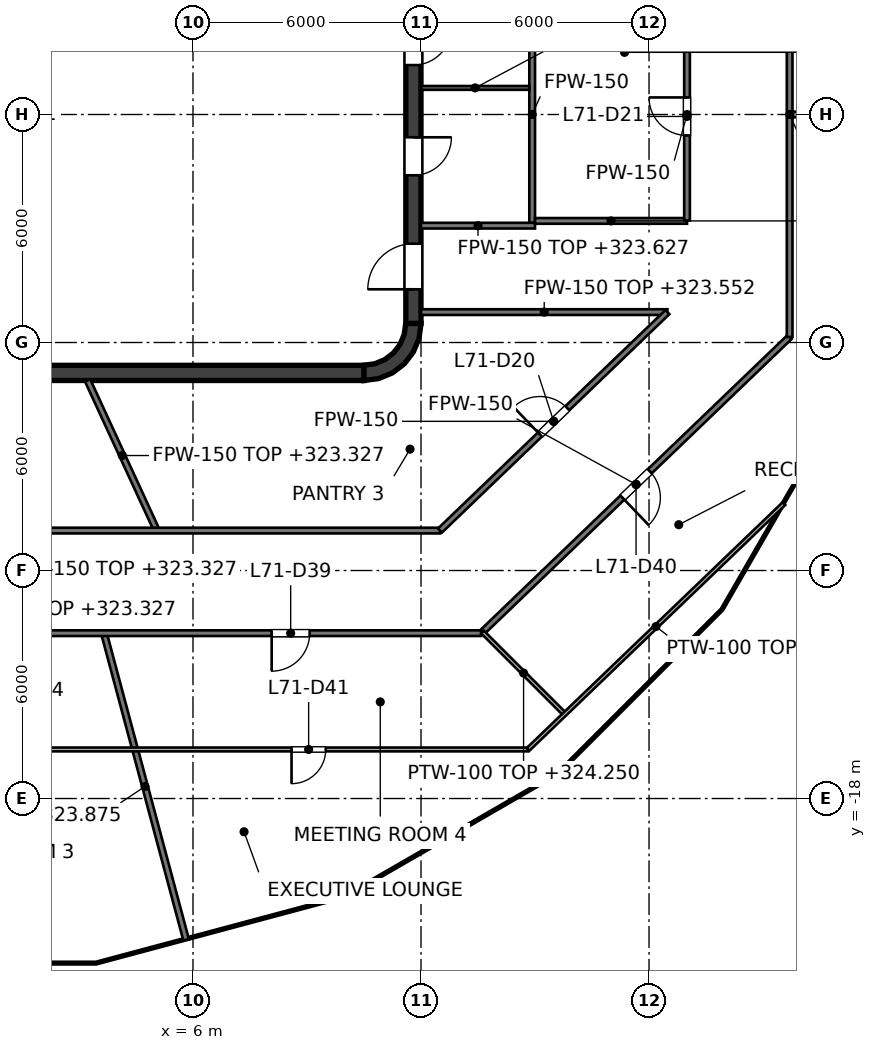
"""IFC4 building model, lengths in metres.
Left out: names, types, materials, properties, quantities, classifications, styles, units other than length and angle.
Written with IfcOpenShell. Run it as: python <this file> out.ifc"""

import sys

from ifc_helpers import new_model, si_unit, direction, frame, frame_2d, origin, place, context, subcontext, project, spatial, polyline, rectangle, outline, extrude, element, fill, save


model = new_model("IFC4")
c1 = context("Model", 3, precision=1e-05, world=origin(), true_north=direction((0.0, 1.0)))
c2 = subcontext(c1, "Body", "Model", "MODEL_VIEW")
j1 = project(units=[si_unit("LENGTHUNIT", "METRE"), si_unit("PLANEANGLEUNIT", "RADIAN")], contexts=[c1])
p1 = place(None, origin())
s1 = spatial("IfcSite", under=j1, at=p1, CompositionType="ELEMENT")
p2 = place(p1, origin())
s2 = spatial("IfcBuilding", under=s1, at=p2, CompositionType="ELEMENT")
p3 = place(p2, frame((0.0, 0.0, 320.4)))
s3 = spatial("IfcBuildingStorey", under=s2, at=p3, CompositionType="ELEMENT", Elevation=320.4)
p4 = place(p3, frame((-10.5, -6.8, 0.0), z_axis=(0.0, 0.0, 1.0), x_axis=(1.0, 0.0, 0.0)))
e1 = element("IfcWall", 1, at=p4, inside=s3, PredefinedType="SHEAR", context=c2, shape_type="SweptSolid", body=[
    extrude(rectangle(XDim=21.0, YDim=0.4, at=frame_2d((10.5, 0.0))), origin(), (0.0, 0.0, 1.0), 4.0),
])
p5 = place(p3, frame((11.8, -5.5, 0.0), z_axis=(0.0, 0.0, 1.0), x_axis=(0.0, 1.0, 0.0)))
e2 = element("IfcWall", 2, at=p5, inside=s3, PredefinedType="SHEAR", context=c2, shape_type="SweptSolid", body=[
    extrude(rectangle(XDim=11.0, YDim=0.4, at=frame_2d((5.5, 0.0))), origin(), (0.0, 0.0, 1.0), 4.0),
])
p6 = place(p5, frame((3.9, 0.0, 0.0)))
e3 = element("IfcOpeningElement", 3, at=p6, cuts=e2, PredefinedType="OPENING", context=c2, shape_type="SweptSolid", body=[
    extrude(rectangle(XDim=1.0, YDim=2.1, at=frame_2d((0.5, 1.05))), frame((0.0, 0.2, 0.0), z_axis=(0.0, -1.0, 0.0), x_axis=(1.0, 0.0, 0.0)), (0.0, 0.0, 1.0), 0.4),
])
p7 = place(p5, frame((6.8, 0.0, 0.0)))
e4 = element("IfcOpeningElement", 4, at=p7, cuts=e2, PredefinedType="OPENING", context=c2, shape_type="SweptSolid", body=[
    extrude(rectangle(XDim=1.0, YDim=2.1, at=frame_2d((0.5, 1.05))), frame((0.0, 0.2, 0.0), z_axis=(0.0, -1.0, 0.0), x_axis=(1.0, 0.0, 0.0)), (0.0, 0.0, 1.0), 0.4),
])
p8 = place(p5, frame((0.9, 0.0, 0.0)))
e5 = element("IfcOpeningElement", 5, at=p8, cuts=e2, PredefinedType="OPENING", context=c2, shape_type="SweptSolid", body=[
    extrude(rectangle(XDim=1.2, YDim=2.1, at=frame_2d((0.6, 1.05))), frame((0.0, 0.2, 0.0), z_axis=(0.0, -1.0, 0.0), x_axis=(1.0, 0.0, 0.0)), (0.0, 0.0, 1.0), 0.4),
])
p9 = place(p5, frame((8.9, 0.0, 0.0)))
e6 = element("IfcOpeningElement", 6, at=p9, cuts=e2, PredefinedType="OPENING", context=c2, shape_type="SweptSolid", body=[
    extrude(rectangle(XDim=1.2, YDim=2.1, at=frame_2d((0.6, 1.05))), frame((0.0, 0.2, 0.0), z_axis=(0.0, -1.0, 0.0), x_axis=(1.0, 0.0, 0.0)), (0.0, 0.0, 1.0), 0.4),
])
p10 = place(p3, origin())
e7 = element("IfcWall", 7, at=p10, inside=s3, PredefinedType="SHEAR", context=c2, shape_type="SweptSolid", body=[
    extrude(outline(polyline([(12.0, -5.5), (11.596, -5.5), (11.559, -5.784), (11.45, -6.048), (11.275, -6.275), (11.048, -6.45), (10.784, -6.559), (10.5, -6.596), (10.5, -7.0), (10.888, -6.949), (11.25, -6.799), (11.561, -6.561), (11.799, -6.25), (11.949, -5.888), (12.0, -5.5)])), origin(), (0.0, 0.0, 1.0), 4.0),
])
p11 = place(p3, frame((9.0, -6.6, 0.0), z_axis=(0.0, 0.0, 1.0), x_axis=(0.0, 1.0, 0.0)))
e8 = element("IfcWall", 8, at=p11, inside=s3, PredefinedType="SOLIDWALL", context=c2, shape_type="SweptSolid", body=[
    extrude(rectangle(XDim=2.5, YDim=0.25, at=frame_2d((1.25, 0.0))), origin(), (0.0, 0.0, 1.0), 3.85),
])
p12 = place(p11, frame((0.65, 0.0, 0.0)))
e9 = element("IfcOpeningElement", 9, at=p12, cuts=e8, PredefinedType="OPENING", context=c2, shape_type="SweptSolid", body=[
    extrude(rectangle(XDim=1.2, YDim=2.1, at=frame_2d((0.6, 1.05))), frame((0.0, 0.125, 0.0), z_axis=(0.0, -1.0, 0.0), x_axis=(1.0, 0.0, 0.0)), (0.0, 0.0, 1.0), 0.25),
])
p13 = place(p3, frame((3.15, -6.6, 0.0), z_axis=(0.0, 0.0, 1.0), x_axis=(0.0, 1.0, 0.0)))
e10 = element("IfcWall", 10, at=p13, inside=s3, PredefinedType="SOLIDWALL", context=c2, shape_type="SweptSolid", body=[
    extrude(rectangle(XDim=2.5, YDim=0.25, at=frame_2d((1.25, 0.0))), origin(), (0.0, 0.0, 1.0), 3.85),
])
p14 = place(p3, frame((0.775, 1.525, 0.0), z_axis=(0.0, 0.0, 1.0), x_axis=(1.0, 0.0, 0.0)))
e11 = element("IfcWall", 11, at=p14, inside=s3, PredefinedType="SOLIDWALL", context=c2, shape_type="SweptSolid", body=[
    extrude(rectangle(XDim=8.35, YDim=0.25, at=frame_2d((4.175, 0.0))), origin(), (0.0, 0.0, 1.0), 3.85),
])
p15 = place(p14, frame((0.925, 0.0, 0.0)))
e12 = element("IfcOpeningElement", 12, at=p15, cuts=e11, PredefinedType="OPENING", context=c2, shape_type="SweptSolid", body=[
    extrude(rectangle(XDim=1.1, YDim=2.1, at=frame_2d((0.55, 1.05))), frame((0.0, 0.125, 0.0), z_axis=(0.0, -1.0, 0.0), x_axis=(1.0, 0.0, 0.0)), (0.0, 0.0, 1.0), 0.25),
])
p16 = place(p14, frame((3.625, 0.0, 0.0)))
e13 = element("IfcOpeningElement", 13, at=p16, cuts=e11, PredefinedType="OPENING", context=c2, shape_type="SweptSolid", body=[
    extrude(rectangle(XDim=1.1, YDim=2.1, at=frame_2d((0.55, 1.05))), frame((0.0, 0.125, 0.0), z_axis=(0.0, -1.0, 0.0), x_axis=(1.0, 0.0, 0.0)), (0.0, 0.0, 1.0), 0.25),
])
p17 = place(p14, frame((6.325, 0.0, 0.0)))
e14 = element("IfcOpeningElement", 14, at=p17, cuts=e11, PredefinedType="OPENING", context=c2, shape_type="SweptSolid", body=[
    extrude(rectangle(XDim=1.1, YDim=2.1, at=frame_2d((0.55, 1.05))), frame((0.0, 0.125, 0.0), z_axis=(0.0, -1.0, 0.0), x_axis=(1.0, 0.0, 0.0)), (0.0, 0.0, 1.0), 0.25),
])
p18 = place(p3, frame((-9.125, -1.525, 0.0), z_axis=(0.0, 0.0, 1.0), x_axis=(1.0, 0.0, 0.0)))
e15 = element("IfcWall", 15, at=p18, inside=s3, PredefinedType="SOLIDWALL", context=c2, shape_type="SweptSolid", body=[
    extrude(rectangle(XDim=18.25, YDim=0.25, at=frame_2d((9.125, 0.0))), origin(), (0.0, 0.0, 1.0), 3.85),
])
p19 = place(p18, frame((7.15, 0.0, 0.0)))
e16 = element("IfcOpeningElement", 16, at=p19, cuts=e15, PredefinedType="OPENING", context=c2, shape_type="SweptSolid", body=[
    extrude(rectangle(XDim=1.2, YDim=2.1, at=frame_2d((0.6, 1.05))), frame((0.0, 0.125, 0.0), z_axis=(0.0, -1.0, 0.0), x_axis=(1.0, 0.0, 0.0)), (0.0, 0.0, 1.0), 0.25),
])
p20 = place(p18, frame((10.2, 0.0, 0.0)))
e17 = element("IfcOpeningElement", 17, at=p20, cuts=e15, PredefinedType="OPENING", context=c2, shape_type="SweptSolid", body=[
    extrude(rectangle(XDim=1.2, YDim=2.1, at=frame_2d((0.6, 1.05))), frame((0.0, 0.125, 0.0), z_axis=(0.0, -1.0, 0.0), x_axis=(1.0, 0.0, 0.0)), (0.0, 0.0, 1.0), 0.25),
])
p21 = place(p18, frame((16.075, 0.0, 0.0)))
e18 = element("IfcOpeningElement", 18, at=p21, cuts=e15, PredefinedType="OPENING", context=c2, shape_type="SweptSolid", body=[
    extrude(rectangle(XDim=1.0, YDim=2.1, at=frame_2d((0.5, 1.05))), frame((0.0, 0.125, 0.0), z_axis=(0.0, -1.0, 0.0), x_axis=(1.0, 0.0, 0.0)), (0.0, 0.0, 1.0), 0.25),
])
p22 = place(p3, frame((-9.125, -3.975, 0.0), z_axis=(0.0, 0.0, 1.0), x_axis=(1.0, 0.0, 0.0)))
e19 = element("IfcWall", 19, at=p22, inside=s3, PredefinedType="SOLIDWALL", context=c2, shape_type="SweptSolid", body=[
    extrude(rectangle(XDim=12.4, YDim=0.25, at=frame_2d((6.2, 0.0))), origin(), (0.0, 0.0, 1.0), 3.85),
])
p23 = place(p22, frame((1.05, 0.0, 0.0)))
e20 = element("IfcOpeningElement", 20, at=p23, cuts=e19, PredefinedType="OPENING", context=c2, shape_type="SweptSolid", body=[
    extrude(rectangle(XDim=1.2, YDim=2.1, at=frame_2d((0.6, 1.05))), frame((0.0, 0.125, 0.0), z_axis=(0.0, -1.0, 0.0), x_axis=(1.0, 0.0, 0.0)), (0.0, 0.0, 1.0), 0.25),
])
p24 = place(p22, frame((4.1, 0.0, 0.0)))
e21 = element("IfcOpeningElement", 21, at=p24, cuts=e19, PredefinedType="OPENING", context=c2, shape_type="SweptSolid", body=[
    extrude(rectangle(XDim=1.2, YDim=2.1, at=frame_2d((0.6, 1.05))), frame((0.0, 0.125, 0.0), z_axis=(0.0, -1.0, 0.0), x_axis=(1.0, 0.0, 0.0)), (0.0, 0.0, 1.0), 0.25),
])
p25 = place(p3, frame((3.275, -3.975, 0.0), z_axis=(0.0, 0.0, 1.0), x_axis=(1.0, 0.0, 0.0)))
e22 = element("IfcWall", 22, at=p25, inside=s3, PredefinedType="SOLIDWALL", context=c2, shape_type="SweptSolid", body=[
    extrude(rectangle(XDim=5.85, YDim=0.25, at=frame_2d((2.925, 0.0))), origin(), (0.0, 0.0, 1.0), 3.85),
])
for number, where, z_axis, x_axis in (
    (23, (3.2, -3.85, 0.0), (0.0, 0.0, 1.0), (0.0, 1.0, 0.0)),
    (24, (5.9, -3.85, 0.0), (0.0, 0.0, 1.0), (0.0, 1.0, 0.0)),
    (25, (9.0, -3.85, 0.0), (0.0, 0.0, 1.0), (0.0, 1.0, 0.0)),
):
    element("IfcWall", number, at=place(p3, frame(where, z_axis=z_axis, x_axis=x_axis)), inside=s3, PredefinedType="SOLIDWALL", context=c2, shape_type="SweptSolid", body=[
        extrude(rectangle(XDim=2.2, YDim=0.25, at=frame_2d((1.1, 0.0))), origin(), (0.0, 0.0, 1.0), 3.85),
    ])
p26 = place(p3, frame((14.925, -2.85, 0.0), z_axis=(0.0, 0.0, 1.0), x_axis=(0.0, 1.0, 0.0)))
e26 = element("IfcWall", 26, at=p26, inside=s3, PredefinedType="PARTITIONING", context=c2, shape_type="SweptSolid", body=[
    extrude(rectangle(XDim=5.7, YDim=0.15, at=frame_2d((2.85, 0.0))), origin(), (0.0, 0.0, 1.0), 3.076),
])
p27 = place(p3, frame((12.0, -2.925, 0.0), z_axis=(0.0, 0.0, 1.0), x_axis=(1.0, 0.0, 0.0)))
e27 = element("IfcWall", 27, at=p27, inside=s3, PredefinedType="PARTITIONING", context=c2, shape_type="SweptSolid", body=[
    extrude(rectangle(XDim=3.0, YDim=0.15, at=frame_2d((1.5, 0.0))), origin(), (0.0, 0.0, 1.0), 3.228),
])
p28 = place(p3, frame((12.0, 0.7, 0.0), z_axis=(0.0, 0.0, 1.0), x_axis=(1.0, 0.0, 0.0)))
e28 = element("IfcWall", 28, at=p28, inside=s3, PredefinedType="PARTITIONING", context=c2, shape_type="SweptSolid", body=[
    extrude(rectangle(XDim=2.85, YDim=0.1, at=frame_2d((1.425, 0.0))), origin(), (0.0, 0.0, 1.0), 3.85),
])
p29 = place(p3, frame((3.657, -13.649, 0.0), z_axis=(0.0, 0.0, 1.0), x_axis=(0.258877815031, -0.965910077018, 0.0)))
e29 = element("IfcWall", 29, at=p29, inside=s3, PredefinedType="PARTITIONING", context=c2, shape_type="SweptSolid", body=[
    extrude(rectangle(XDim=8.352, YDim=0.15, at=frame_2d((4.176, 0.0))), origin(), (0.0, 0.0, 1.0), 3.475),
])
p30 = place(p3, frame((3.229, -7.0, 0.0), z_axis=(0.0, 0.0, 1.0), x_axis=(0.418762657012, -0.908095720226, 0.0)))
e30 = element("IfcWall", 30, at=p30, inside=s3, PredefinedType="PARTITIONING", context=c2, shape_type="SweptSolid", body=[
    extrude(rectangle(XDim=4.349, YDim=0.15, at=frame_2d((2.174, 0.0))), origin(), (0.0, 0.0, 1.0), 2.927),
])
p31 = place(p3, frame((-13.584, -13.649, 0.0), z_axis=(0.0, 0.0, 1.0), x_axis=(1.0, 0.0, 0.0)))
e31 = element("IfcWall", 31, at=p31, inside=s3, PredefinedType="PARTITIONING", context=c2, shape_type="SweptSolid", body=[
    extrude(rectangle(XDim=27.168, YDim=0.15, at=frame_2d((13.584, 0.0))), origin(), (0.0, 0.0, 1.0), 2.927),
])
p32 = place(p31, frame((10.922, 0.0, 0.0)))
e32 = element("IfcOpeningElement", 32, at=p32, cuts=e31, PredefinedType="OPENING", context=c2, shape_type="SweptSolid", body=[
    extrude(rectangle(XDim=1.0, YDim=2.1, at=frame_2d((0.5, 1.05))), frame((0.0, 0.075, 0.0), z_axis=(0.0, -1.0, 0.0), x_axis=(1.0, 0.0, 0.0)), (0.0, 0.0, 1.0), 0.15),
])
p33 = place(p31, frame((21.654, 0.0, 0.0)))
e33 = element("IfcOpeningElement", 33, at=p33, cuts=e31, PredefinedType="OPENING", context=c2, shape_type="SweptSolid", body=[
    extrude(rectangle(XDim=1.0, YDim=2.1, at=frame_2d((0.5, 1.05))), frame((0.0, 0.075, 0.0), z_axis=(0.0, -1.0, 0.0), x_axis=(1.0, 0.0, 0.0)), (0.0, 0.0, 1.0), 0.15),
])
p34 = place(p3, frame((-12.498, -10.949, 0.0), z_axis=(0.0, 0.0, 1.0), x_axis=(1.0, 0.0, 0.0)))
e34 = element("IfcWall", 34, at=p34, inside=s3, PredefinedType="PARTITIONING", context=c2, shape_type="SweptSolid", body=[
    extrude(rectangle(XDim=24.996, YDim=0.15, at=frame_2d((12.498, 0.0))), origin(), (0.0, 0.0, 1.0), 2.927),
])
p35 = place(p34, frame((11.948, 0.0, 0.0)))
e35 = element("IfcOpeningElement", 35, at=p35, cuts=e34, PredefinedType="OPENING", context=c2, shape_type="SweptSolid", body=[
    extrude(rectangle(XDim=1.0, YDim=2.1, at=frame_2d((0.5, 1.05))), frame((0.0, 0.075, 0.0), z_axis=(0.0, -1.0, 0.0), x_axis=(1.0, 0.0, 0.0)), (0.0, 0.0, 1.0), 0.15),
])
p36 = place(p3, frame((12.0, -5.2, 0.0), z_axis=(0.0, 0.0, 1.0), x_axis=(1.0, 0.0, 0.0)))
e36 = element("IfcWall", 36, at=p36, inside=s3, PredefinedType="PARTITIONING", context=c2, shape_type="SweptSolid", body=[
    extrude(rectangle(XDim=6.484, YDim=0.15, at=frame_2d((3.242, 0.0))), origin(), (0.0, 0.0, 1.0), 3.152),
])
p37 = place(p3, frame((15.0, -2.8, 0.0), z_axis=(0.0, 0.0, 1.0), x_axis=(1.0, 0.0, 0.0)))
e37 = element("IfcWall", 37, at=p37, inside=s3, PredefinedType="PARTITIONING", context=c2, shape_type="SweptSolid", body=[
    extrude(rectangle(XDim=4.0, YDim=0.15, at=frame_2d((2.0, 0.0))), origin(), (0.0, 0.0, 1.0), 3.85),
])
p38 = place(p3, frame((21.7, 0.0, 0.0), z_axis=(0.0, 0.0, 1.0), x_axis=(1.0, 0.0, 0.0)))
e38 = element("IfcWall", 38, at=p38, inside=s3, PredefinedType="PARTITIONING", context=c2, shape_type="SweptSolid", body=[
    extrude(rectangle(XDim=2.543, YDim=0.15, at=frame_2d((1.271, 0.0))), origin(), (0.0, 0.0, 1.0), 3.228),
])
p39 = place(p3, frame((13.617, -13.617, 0.0), z_axis=(0.0, 0.0, 1.0), x_axis=(0.721264539741, 0.692659702677, 0.0)))
e39 = element("IfcWall", 39, at=p39, inside=s3, PredefinedType="PARTITIONING", context=c2, shape_type="SweptSolid", body=[
    extrude(rectangle(XDim=11.206, YDim=0.15, at=frame_2d((5.603, 0.0))), origin(), (0.0, 0.0, 1.0), 3.076),
])
p40 = place(p39, frame((5.104, 0.0, 0.0)))
e40 = element("IfcOpeningElement", 40, at=p40, cuts=e39, PredefinedType="OPENING", context=c2, shape_type="SweptSolid", body=[
    extrude(rectangle(XDim=1.0, YDim=2.1, at=frame_2d((0.5, 1.05))), frame((0.0, 0.075, 0.0), z_axis=(0.0, -1.0, 0.0), x_axis=(1.0, 0.0, 0.0)), (0.0, 0.0, 1.0), 0.15),
])
p41 = place(p3, frame((12.498, -10.949, 0.0), z_axis=(0.0, 0.0, 1.0), x_axis=(0.721258572397, 0.692665916401, 0.0)))
e41 = element("IfcWall", 41, at=p41, inside=s3, PredefinedType="PARTITIONING", context=c2, shape_type="SweptSolid", body=[
    extrude(rectangle(XDim=8.3, YDim=0.15, at=frame_2d((4.15, 0.0))), origin(), (0.0, 0.0, 1.0), 3.076),
])
p42 = place(p41, frame((3.649, 0.0, 0.0)))
e42 = element("IfcOpeningElement", 42, at=p42, cuts=e41, PredefinedType="OPENING", context=c2, shape_type="SweptSolid", body=[
    extrude(rectangle(XDim=1.0, YDim=2.1, at=frame_2d((0.5, 1.05))), frame((0.0, 0.075, 0.0), z_axis=(0.0, -1.0, 0.0), x_axis=(1.0, 0.0, 0.0)), (0.0, 0.0, 1.0), 0.15),
])
p43 = place(p3, frame((21.7, -5.855, 0.0), z_axis=(0.0, 0.0, 1.0), x_axis=(0.0, 1.0, 0.0)))
e43 = element("IfcWall", 43, at=p43, inside=s3, PredefinedType="PARTITIONING", context=c2, shape_type="SweptSolid", body=[
    extrude(rectangle(XDim=11.71, YDim=0.15, at=frame_2d((5.855, 0.0))), origin(), (0.0, 0.0, 1.0), 3.076),
])
p44 = place(p3, frame((19.0, -2.79, 0.0), z_axis=(0.0, 0.0, 1.0), x_axis=(0.0, 1.0, 0.0)))
e44 = element("IfcWall", 44, at=p44, inside=s3, PredefinedType="PARTITIONING", context=c2, shape_type="SweptSolid", body=[
    extrude(rectangle(XDim=5.58, YDim=0.15, at=frame_2d((2.79, 0.0))), origin(), (0.0, 0.0, 1.0), 3.076),
])
p45 = place(p44, frame((2.239, 0.0, 0.0)))
e45 = element("IfcOpeningElement", 45, at=p45, cuts=e44, PredefinedType="OPENING", context=c2, shape_type="SweptSolid", body=[
    extrude(rectangle(XDim=1.0, YDim=2.1, at=frame_2d((0.5, 1.05))), frame((0.0, 0.075, 0.0), z_axis=(0.0, -1.0, 0.0), x_axis=(1.0, 0.0, 0.0)), (0.0, 0.0, 1.0), 0.15),
])
p46 = place(p3, frame((13.617, -13.617, 0.0), z_axis=(0.0, 0.0, 1.0), x_axis=(0.707106781187, -0.707106781187, 0.0)))
e46 = element("IfcWall", 46, at=p46, inside=s3, PredefinedType="PARTITIONING", context=c2, shape_type="SweptSolid", body=[
    extrude(rectangle(XDim=3.061, YDim=0.1, at=frame_2d((1.53, 0.0))), origin(), (0.0, 0.0, 1.0), 3.85),
])
p47 = place(p3, frame((-14.815, -16.709, 0.0), z_axis=(0.0, 0.0, 1.0), x_axis=(1.0, 0.0, 0.0)))
e47 = element("IfcWall", 47, at=p47, inside=s3, PredefinedType="PARTITIONING", context=c2, shape_type="SweptSolid", body=[
    extrude(rectangle(XDim=29.63, YDim=0.1, at=frame_2d((14.815, 0.0))), origin(), (0.0, 0.0, 1.0), 2.927),
])
p48 = place(p47, frame((11.78, 0.0, 0.0)))
e48 = element("IfcOpeningElement", 48, at=p48, cuts=e47, PredefinedType="OPENING", context=c2, shape_type="SweptSolid", body=[
    extrude(rectangle(XDim=0.9, YDim=2.1, at=frame_2d((0.45, 1.05))), frame((0.0, 0.05, 0.0), z_axis=(0.0, -1.0, 0.0), x_axis=(1.0, 0.0, 0.0)), (0.0, 0.0, 1.0), 0.1),
])
p49 = place(p47, frame((23.408, 0.0, 0.0)))
e49 = element("IfcOpeningElement", 49, at=p49, cuts=e47, PredefinedType="OPENING", context=c2, shape_type="SweptSolid", body=[
    extrude(rectangle(XDim=0.9, YDim=2.1, at=frame_2d((0.45, 1.05))), frame((0.0, 0.05, 0.0), z_axis=(0.0, -1.0, 0.0), x_axis=(1.0, 0.0, 0.0)), (0.0, 0.0, 1.0), 0.1),
])
p50 = place(p3, frame((14.815, -16.709, 0.0), z_axis=(0.0, 0.0, 1.0), x_axis=(0.721235811033, 0.692689616555, 0.0)))
e50 = element("IfcWall", 50, at=p50, inside=s3, PredefinedType="PARTITIONING", context=c2, shape_type="SweptSolid", body=[
    extrude(rectangle(XDim=9.339, YDim=0.1, at=frame_2d((4.67, 0.0))), origin(), (0.0, 0.0, 1.0), 3.076),
])
p51 = place(p15, origin())
e51 = element("IfcDoor", 51, at=p51, inside=s3, OperationType="DOUBLE_DOOR_SLIDING", PredefinedType="DOOR", context=c2, shape_type="SweptSolid", body=[
    extrude(rectangle(XDim=1.1, YDim=2.1, at=frame_2d((0.55, 1.05))), frame((0.0, 0.025, 0.0), z_axis=(0.0, -1.0, 0.0), x_axis=(1.0, 0.0, 0.0)), (0.0, 0.0, 1.0), 0.05),
])
fill(e12, e51)
p52 = place(p16, origin())
e52 = element("IfcDoor", 52, at=p52, inside=s3, OperationType="DOUBLE_DOOR_SLIDING", PredefinedType="DOOR", context=c2, shape_type="SweptSolid", body=[
    extrude(rectangle(XDim=1.1, YDim=2.1, at=frame_2d((0.55, 1.05))), frame((0.0, 0.025, 0.0), z_axis=(0.0, -1.0, 0.0), x_axis=(1.0, 0.0, 0.0)), (0.0, 0.0, 1.0), 0.05),
])
fill(e13, e52)
p53 = place(p17, origin())
e53 = element("IfcDoor", 53, at=p53, inside=s3, OperationType="DOUBLE_DOOR_SLIDING", PredefinedType="DOOR", context=c2, shape_type="SweptSolid", body=[
    extrude(rectangle(XDim=1.1, YDim=2.1, at=frame_2d((0.55, 1.05))), frame((0.0, 0.025, 0.0), z_axis=(0.0, -1.0, 0.0), x_axis=(1.0, 0.0, 0.0)), (0.0, 0.0, 1.0), 0.05),
])
fill(e14, e53)
p54 = place(p12, origin())
e54 = element("IfcDoor", 54, at=p54, inside=s3, OperationType="SINGLE_SWING_LEFT", PredefinedType="DOOR", context=c2, shape_type="SweptSolid", body=[
    extrude(rectangle(XDim=1.2, YDim=2.1, at=frame_2d((0.6, 1.05))), frame((0.0, 0.025, 0.0), z_axis=(0.0, -1.0, 0.0), x_axis=(1.0, 0.0, 0.0)), (0.0, 0.0, 1.0), 0.05),
])
fill(e9, e54)
p55 = place(p21, origin())
e55 = element("IfcDoor", 55, at=p55, inside=s3, OperationType="SINGLE_SWING_RIGHT", PredefinedType="DOOR", context=c2, shape_type="SweptSolid", body=[
    extrude(rectangle(XDim=1.0, YDim=2.1, at=frame_2d((0.5, 1.05))), frame((0.0, 0.025, 0.0), z_axis=(0.0, -1.0, 0.0), x_axis=(1.0, 0.0, 0.0)), (0.0, 0.0, 1.0), 0.05),
])
fill(e18, e55)
p56 = place(p6, origin())
e56 = element("IfcDoor", 56, at=p56, inside=s3, OperationType="SINGLE_SWING_RIGHT", PredefinedType="DOOR", context=c2, shape_type="SweptSolid", body=[
    extrude(rectangle(XDim=1.0, YDim=2.1, at=frame_2d((0.5, 1.05))), frame((0.0, 0.025, 0.0), z_axis=(0.0, -1.0, 0.0), x_axis=(1.0, 0.0, 0.0)), (0.0, 0.0, 1.0), 0.05),
])
fill(e3, e56)
p57 = place(p7, origin())
e57 = element("IfcDoor", 57, at=p57, inside=s3, OperationType="SINGLE_SWING_RIGHT", PredefinedType="DOOR", context=c2, shape_type="SweptSolid", body=[
    extrude(rectangle(XDim=1.0, YDim=2.1, at=frame_2d((0.5, 1.05))), frame((0.0, 0.025, 0.0), z_axis=(0.0, -1.0, 0.0), x_axis=(1.0, 0.0, 0.0)), (0.0, 0.0, 1.0), 0.05),
])
fill(e4, e57)
p58 = place(p8, origin())
e58 = element("IfcDoor", 58, at=p58, inside=s3, OperationType="SINGLE_SWING_LEFT", PredefinedType="DOOR", context=c2, shape_type="SweptSolid", body=[
    extrude(rectangle(XDim=1.2, YDim=2.1, at=frame_2d((0.6, 1.05))), frame((0.0, 0.025, 0.0), z_axis=(0.0, -1.0, 0.0), x_axis=(1.0, 0.0, 0.0)), (0.0, 0.0, 1.0), 0.05),
])
fill(e5, e58)
p59 = place(p42, origin())
e59 = element("IfcDoor", 59, at=p59, inside=s3, OperationType="SINGLE_SWING_LEFT", PredefinedType="DOOR", context=c2, shape_type="SweptSolid", body=[
    extrude(rectangle(XDim=1.0, YDim=2.1, at=frame_2d((0.5, 1.05))), frame((0.0, 0.025, 0.0), z_axis=(0.0, -1.0, 0.0), x_axis=(1.0, 0.0, 0.0)), (0.0, 0.0, 1.0), 0.05),
])
fill(e42, e59)
p60 = place(p45, origin())
e60 = element("IfcDoor", 60, at=p60, inside=s3, OperationType="SINGLE_SWING_RIGHT", PredefinedType="DOOR", context=c2, shape_type="SweptSolid", body=[
    extrude(rectangle(XDim=1.0, YDim=2.1, at=frame_2d((0.5, 1.05))), frame((0.0, 0.025, 0.0), z_axis=(0.0, -1.0, 0.0), x_axis=(1.0, 0.0, 0.0)), (0.0, 0.0, 1.0), 0.05),
])
fill(e45, e60)
p61 = place(p33, origin())
e61 = element("IfcDoor", 61, at=p61, inside=s3, OperationType="SINGLE_SWING_LEFT", PredefinedType="DOOR", context=c2, shape_type="SweptSolid", body=[
    extrude(rectangle(XDim=1.0, YDim=2.1, at=frame_2d((0.5, 1.05))), frame((0.0, 0.025, 0.0), z_axis=(0.0, -1.0, 0.0), x_axis=(1.0, 0.0, 0.0)), (0.0, 0.0, 1.0), 0.05),
])
fill(e33, e61)
p62 = place(p40, origin())
e62 = element("IfcDoor", 62, at=p62, inside=s3, OperationType="SINGLE_SWING_LEFT", PredefinedType="DOOR", context=c2, shape_type="SweptSolid", body=[
    extrude(rectangle(XDim=1.0, YDim=2.1, at=frame_2d((0.5, 1.05))), frame((0.0, 0.025, 0.0), z_axis=(0.0, -1.0, 0.0), x_axis=(1.0, 0.0, 0.0)), (0.0, 0.0, 1.0), 0.05),
])
fill(e40, e62)
p63 = place(p49, origin())
e63 = element("IfcDoor", 63, at=p63, inside=s3, OperationType="SINGLE_SWING_LEFT", PredefinedType="DOOR", context=c2, shape_type="SweptSolid", body=[
    extrude(rectangle(XDim=0.9, YDim=2.1, at=frame_2d((0.45, 1.05))), frame((0.0, 0.025, 0.0), z_axis=(0.0, -1.0, 0.0), x_axis=(1.0, 0.0, 0.0)), (0.0, 0.0, 1.0), 0.05),
])
fill(e49, e63)
save(model, sys.argv[1])
